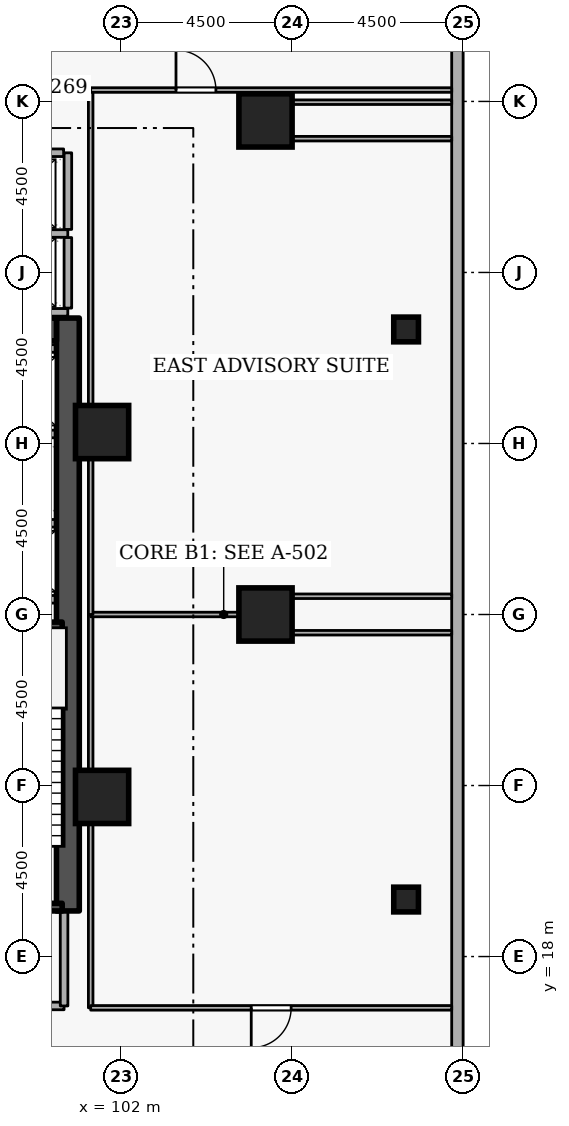
"""IFC4 building model, lengths in metres.
Left out: names, types, materials, properties, quantities, classifications, styles, units other than length and angle.
Written with IfcOpenShell. Run it as: python <this file> out.ifc"""

import sys

from ifc_helpers import new_model, si_unit, direction, frame, frame_2d, origin, origin_2d, place, context, subcontext, project, spatial, rectangle, extrude, element, fill, save


model = new_model("IFC4")
c1 = context("Model", 3, precision=1e-05, world=origin(), true_north=direction((0.0, 1.0)))
c2 = subcontext(c1, "Body", "Model", "MODEL_VIEW")
j1 = project(units=[si_unit("LENGTHUNIT", "METRE"), si_unit("PLANEANGLEUNIT", "RADIAN")], contexts=[c1])
p1 = place(None, origin())
s1 = spatial("IfcSite", under=j1, at=p1, CompositionType="ELEMENT")
p2 = place(p1, origin())
s2 = spatial("IfcBuilding", under=s1, at=p2, CompositionType="ELEMENT")
p3 = place(p2, frame((0.0, 0.0, 18.6)))
s3 = spatial("IfcBuildingStorey", under=s2, at=p3, CompositionType="ELEMENT", Elevation=18.6)
p4 = place(p3, frame((100.6, 19.2, 0.0), z_axis=(0.0, 0.0, 1.0), x_axis=(0.0, 1.0, 0.0)))
e1 = element("IfcWall", 1, at=p4, inside=s3, PredefinedType="SHEAR", context=c2, shape_type="SweptSolid", body=[
    extrude(rectangle(XDim=15.6, YDim=0.6, at=frame_2d((7.8, 0.0))), origin(), (0.0, 0.0, 1.0), 4.5),
])
p5 = place(p3, frame((94.6, 34.5, 0.0), z_axis=(0.0, 0.0, 1.0), x_axis=(1.0, 0.0, 0.0)))
e2 = element("IfcWall", 2, at=p5, inside=s3, PredefinedType="SHEAR", context=c2, shape_type="SweptSolid", body=[
    extrude(rectangle(XDim=5.7, YDim=0.6, at=frame_2d((2.85, 0.0))), origin(), (0.0, 0.0, 1.0), 4.5),
])
for number, where, z_axis, x_axis in (
    (3, (105.8, 27.0, 0.0), (0.0, 0.0, 1.0), (1.0, 0.0, 0.0)),
    (4, (105.8, 40.0, 0.0), (0.0, 0.0, 1.0), (1.0, 0.0, 0.0)),
    (5, (101.5, 22.2, 0.0), (0.0, 0.0, 1.0), (1.0, 0.0, 0.0)),
    (6, (101.5, 31.8, 0.0), (0.0, 0.0, 1.0), (1.0, 0.0, 0.0)),
):
    element("IfcColumn", number, at=place(p3, frame(where, z_axis=z_axis, x_axis=x_axis)), inside=s3, PredefinedType="COLUMN", context=c2, shape_type="SweptSolid", body=[
        extrude(rectangle(XDim=1.4, YDim=1.4, at=origin_2d()), origin(), (0.0, 0.0, 1.0), 4.5),
    ])
for number, where, z_axis, x_axis in (
    (7, (109.5, 19.5, 0.0), (0.0, 0.0, 1.0), (1.0, 0.0, 0.0)),
    (8, (109.5, 34.5, 0.0), (0.0, 0.0, 1.0), (1.0, 0.0, 0.0)),
):
    element("IfcColumn", number, at=place(p3, frame(where, z_axis=z_axis, x_axis=x_axis)), inside=s3, PredefinedType="COLUMN", context=c2, shape_type="SweptSolid", body=[
        extrude(rectangle(XDim=0.65, YDim=0.65, at=origin_2d()), origin(), (0.0, 0.0, 1.0), 4.5),
    ])
p6 = place(p3, frame((110.85, 10.82, 0.0), z_axis=(0.0, 0.0, 1.0), x_axis=(0.0, 1.0, 0.0)))
e9 = element("IfcWall", 9, at=p6, inside=s3, PredefinedType="STANDARD", context=c2, shape_type="SweptSolid", body=[
    extrude(rectangle(XDim=38.36, YDim=0.3, at=frame_2d((19.18, 0.0))), origin(), (0.0, 0.0, 1.0), 3.56),
])
for number, where, z_axis, x_axis in (
    (10, (97.852, 29.4, 0.0), (0.0, 0.0, 1.0), (1.0, 0.0, 0.0)),
    (11, (97.852, 27.4, 0.0), (0.0, 0.0, 1.0), (1.0, 0.0, 0.0)),
    (12, (97.852, 31.75, 0.0), (0.0, 0.0, 1.0), (1.0, 0.0, 0.0)),
    (13, (97.852, 34.0, 0.0), (0.0, 0.0, 1.0), (1.0, 0.0, 0.0)),
):
    element("IfcWall", number, at=place(p3, frame(where, z_axis=z_axis, x_axis=x_axis)), inside=s3, PredefinedType="STANDARD", context=c2, shape_type="SweptSolid", body=[
        extrude(rectangle(XDim=2.436, YDim=0.2, at=frame_2d((1.218, 0.0))), origin(), (0.0, 0.0, 1.0), 4.16),
    ])
for number, where, z_axis, x_axis in (
    (14, (97.852, 37.025, 0.0), (0.0, 0.0, 1.0), (1.0, 0.0, 0.0)),
    (15, (97.852, 34.95, 0.0), (0.0, 0.0, 1.0), (1.0, 0.0, 0.0)),
):
    element("IfcWall", number, at=place(p3, frame(where, z_axis=z_axis, x_axis=x_axis)), inside=s3, PredefinedType="STANDARD", context=c2, shape_type="SweptSolid", body=[
        extrude(rectangle(XDim=2.746, YDim=0.2, at=frame_2d((1.373, 0.0))), origin(), (0.0, 0.0, 1.0), 4.16),
    ])
p7 = place(p3, frame((100.6, 35.062, 0.0), z_axis=(0.0, 0.0, 1.0), x_axis=(0.0, 1.0, 0.0)))
e16 = element("IfcWall", 16, at=p7, inside=s3, PredefinedType="STANDARD", context=c2, shape_type="SweptSolid", body=[
    extrude(rectangle(XDim=1.856, YDim=0.2, at=frame_2d((0.928, 0.0))), origin(), (0.0, 0.0, 1.0), 4.16),
])
p8 = place(p3, frame((100.6, 37.132, 0.0), z_axis=(0.0, 0.0, 1.0), x_axis=(0.0, 1.0, 0.0)))
e17 = element("IfcWall", 17, at=p8, inside=s3, PredefinedType="STANDARD", context=c2, shape_type="SweptSolid", body=[
    extrude(rectangle(XDim=2.016, YDim=0.2, at=frame_2d((1.008, 0.0))), origin(), (0.0, 0.0, 1.0), 4.16),
])
p9 = place(p3, frame((97.852, 39.15, 0.0), z_axis=(0.0, 0.0, 1.0), x_axis=(1.0, 0.0, 0.0)))
e18 = element("IfcWall", 18, at=p9, inside=s3, PredefinedType="STANDARD", context=c2, shape_type="SweptSolid", body=[
    extrude(rectangle(XDim=2.636, YDim=0.2, at=frame_2d((1.318, 0.0))), origin(), (0.0, 0.0, 1.0), 4.16),
])
p10 = place(p3, frame((100.45, 19.3, 0.0), z_axis=(0.0, 0.0, 1.0), x_axis=(-1.0, 0.0, 0.0)))
e19 = element("IfcWall", 19, at=p10, inside=s3, PredefinedType="SHEAR", context=c2, shape_type="SweptSolid", body=[
    extrude(rectangle(XDim=3.35, YDim=0.2, at=frame_2d((1.675, 0.0))), origin(), (0.0, 0.0, 1.0), 4.5),
])
p11 = place(p10, frame((1.125, 0.0, 0.0)))
e20 = element("IfcOpeningElement", 20, at=p11, cuts=e19, PredefinedType="OPENING", context=c2, shape_type="SweptSolid", body=[
    extrude(rectangle(XDim=1.1, YDim=2.1, at=frame_2d((0.55, 1.05))), frame((0.0, 0.11, 0.0), z_axis=(0.0, -1.0, 0.0), x_axis=(1.0, 0.0, 0.0)), (0.0, 0.0, 1.0), 0.22),
])
p12 = place(p3, frame((97.1, 26.7, 0.0), z_axis=(0.0, 0.0, 1.0), x_axis=(1.0, 0.0, 0.0)))
e21 = element("IfcWall", 21, at=p12, inside=s3, PredefinedType="SHEAR", context=c2, shape_type="SweptSolid", body=[
    extrude(rectangle(XDim=3.35, YDim=0.2, at=frame_2d((1.675, 0.0))), origin(), (0.0, 0.0, 1.0), 4.5),
])
p13 = place(p3, frame((95.35, 16.7, 0.0), z_axis=(0.0, 0.0, 1.0), x_axis=(1.0, 0.0, 0.0)))
e22 = element("IfcWall", 22, at=p13, inside=s3, PredefinedType="STANDARD", context=c2, shape_type="SweptSolid", body=[
    extrude(rectangle(XDim=5.15, YDim=0.2, at=frame_2d((2.575, 0.0))), origin(), (0.0, 0.0, 1.0), 4.16),
])
p14 = place(p13, frame((2.0, 0.0, 0.0)))
e23 = element("IfcOpeningElement", 23, at=p14, cuts=e22, PredefinedType="OPENING", context=c2, shape_type="SweptSolid", body=[
    extrude(rectangle(XDim=1.15, YDim=2.1, at=frame_2d((0.575, 1.05))), frame((0.0, 0.11, 0.0), z_axis=(0.0, -1.0, 0.0), x_axis=(1.0, 0.0, 0.0)), (0.0, 0.0, 1.0), 0.22),
])
p15 = place(p3, frame((100.5, 16.7, 0.0), z_axis=(0.0, 0.0, 1.0), x_axis=(0.0, 1.0, 0.0)))
e24 = element("IfcWall", 24, at=p15, inside=s3, PredefinedType="STANDARD", context=c2, shape_type="SweptSolid", body=[
    extrude(rectangle(XDim=2.5, YDim=0.2, at=frame_2d((1.25, 0.0))), origin(), (0.0, 0.0, 1.0), 4.16),
])
p16 = place(p3, frame((101.2, 16.65, 0.0), z_axis=(0.0, 0.0, 1.0), x_axis=(0.0, 1.0, 0.0)))
e25 = element("IfcWall", 25, at=p16, inside=s3, PredefinedType="PARTITIONING", context=c2, shape_type="SweptSolid", body=[
    extrude(rectangle(XDim=10.35, YDim=0.12, at=frame_2d((5.175, 0.0))), origin(), (0.0, 0.0, 1.0), 4.16),
])
p17 = place(p3, frame((101.2, 27.0, 0.0), z_axis=(0.0, 0.0, 1.0), x_axis=(1.0, 0.0, 0.0)))
e26 = element("IfcWall", 26, at=p17, inside=s3, PredefinedType="PARTITIONING", context=c2, shape_type="SweptSolid", body=[
    extrude(rectangle(XDim=4.6, YDim=0.12, at=frame_2d((2.3, 0.0))), origin(), (0.0, 0.0, 1.0), 4.16),
])
p18 = place(p3, frame((105.8, 26.52, 0.0), z_axis=(0.0, 0.0, 1.0), x_axis=(1.0, 0.0, 0.0)))
e27 = element("IfcWall", 27, at=p18, inside=s3, PredefinedType="PARTITIONING", context=c2, shape_type="SweptSolid", body=[
    extrude(rectangle(XDim=4.9, YDim=0.12, at=frame_2d((2.45, 0.0))), origin(), (0.0, 0.0, 1.0), 4.16),
])
p19 = place(p3, frame((110.7, 16.65, 0.0), z_axis=(0.0, 0.0, 1.0), x_axis=(-1.0, 0.0, 0.0)))
e28 = element("IfcWall", 28, at=p19, inside=s3, PredefinedType="PARTITIONING", context=c2, shape_type="SweptSolid", body=[
    extrude(rectangle(XDim=9.5, YDim=0.12, at=frame_2d((4.75, 0.0))), origin(), (0.0, 0.0, 1.0), 4.16),
])
p20 = place(p19, frame((4.225, 0.0, 0.0)))
e29 = element("IfcOpeningElement", 29, at=p20, cuts=e28, PredefinedType="OPENING", context=c2, shape_type="SweptSolid", body=[
    extrude(rectangle(XDim=1.05, YDim=2.1, at=frame_2d((0.525, 1.05))), frame((0.0, 0.07, 0.0), z_axis=(0.0, -1.0, 0.0), x_axis=(1.0, 0.0, 0.0)), (0.0, 0.0, 1.0), 0.14),
])
p21 = place(p3, frame((101.2, 27.0, 0.0), z_axis=(0.0, 0.0, 1.0), x_axis=(0.0, 1.0, 0.0)))
e30 = element("IfcWall", 30, at=p21, inside=s3, PredefinedType="PARTITIONING", context=c2, shape_type="SweptSolid", body=[
    extrude(rectangle(XDim=13.8, YDim=0.12, at=frame_2d((6.9, 0.0))), origin(), (0.0, 0.0, 1.0), 4.16),
])
p22 = place(p3, frame((101.2, 40.8, 0.0), z_axis=(0.0, 0.0, 1.0), x_axis=(1.0, 0.0, 0.0)))
e31 = element("IfcWall", 31, at=p22, inside=s3, PredefinedType="PARTITIONING", context=c2, shape_type="SweptSolid", body=[
    extrude(rectangle(XDim=9.5, YDim=0.12, at=frame_2d((4.75, 0.0))), origin(), (0.0, 0.0, 1.0), 4.16),
])
p23 = place(p22, frame((2.245, 0.0, 0.0)))
e32 = element("IfcOpeningElement", 32, at=p23, cuts=e31, PredefinedType="OPENING", context=c2, shape_type="SweptSolid", body=[
    extrude(rectangle(XDim=1.05, YDim=2.1, at=frame_2d((0.525, 1.05))), frame((0.0, 0.07, 0.0), z_axis=(0.0, -1.0, 0.0), x_axis=(1.0, 0.0, 0.0)), (0.0, 0.0, 1.0), 0.14),
])
for number, where, z_axis, x_axis in (
    (33, (110.7, 40.48, 0.0), (0.0, 0.0, 1.0), (-1.0, 0.0, 0.0)),
    (34, (105.8, 39.52, 0.0), (0.0, 0.0, 1.0), (1.0, 0.0, 0.0)),
    (35, (110.7, 27.48, 0.0), (0.0, 0.0, 1.0), (-1.0, 0.0, 0.0)),
):
    element("IfcWall", number, at=place(p3, frame(where, z_axis=z_axis, x_axis=x_axis)), inside=s3, PredefinedType="PARTITIONING", context=c2, shape_type="SweptSolid", body=[
        extrude(rectangle(XDim=4.9, YDim=0.12, at=frame_2d((2.45, 0.0))), origin(), (0.0, 0.0, 1.0), 4.16),
    ])
p24 = place(p20, origin())
e36 = element("IfcDoor", 36, at=p24, inside=s3, OperationType="SINGLE_SWING_RIGHT", PredefinedType="DOOR", context=c2, shape_type="SweptSolid", body=[
    extrude(rectangle(XDim=1.05, YDim=2.1, at=frame_2d((0.525, 1.05))), frame((0.0, 0.025, 0.0), z_axis=(0.0, -1.0, 0.0), x_axis=(1.0, 0.0, 0.0)), (0.0, 0.0, 1.0), 0.05),
])
fill(e29, e36)
p25 = place(p23, origin())
e37 = element("IfcDoor", 37, at=p25, inside=s3, OperationType="SINGLE_SWING_LEFT", PredefinedType="DOOR", context=c2, shape_type="SweptSolid", body=[
    extrude(rectangle(XDim=1.05, YDim=2.1, at=frame_2d((0.525, 1.05))), frame((0.0, 0.025, 0.0), z_axis=(0.0, -1.0, 0.0), x_axis=(1.0, 0.0, 0.0)), (0.0, 0.0, 1.0), 0.05),
])
fill(e32, e37)
save(model, sys.argv[1])
